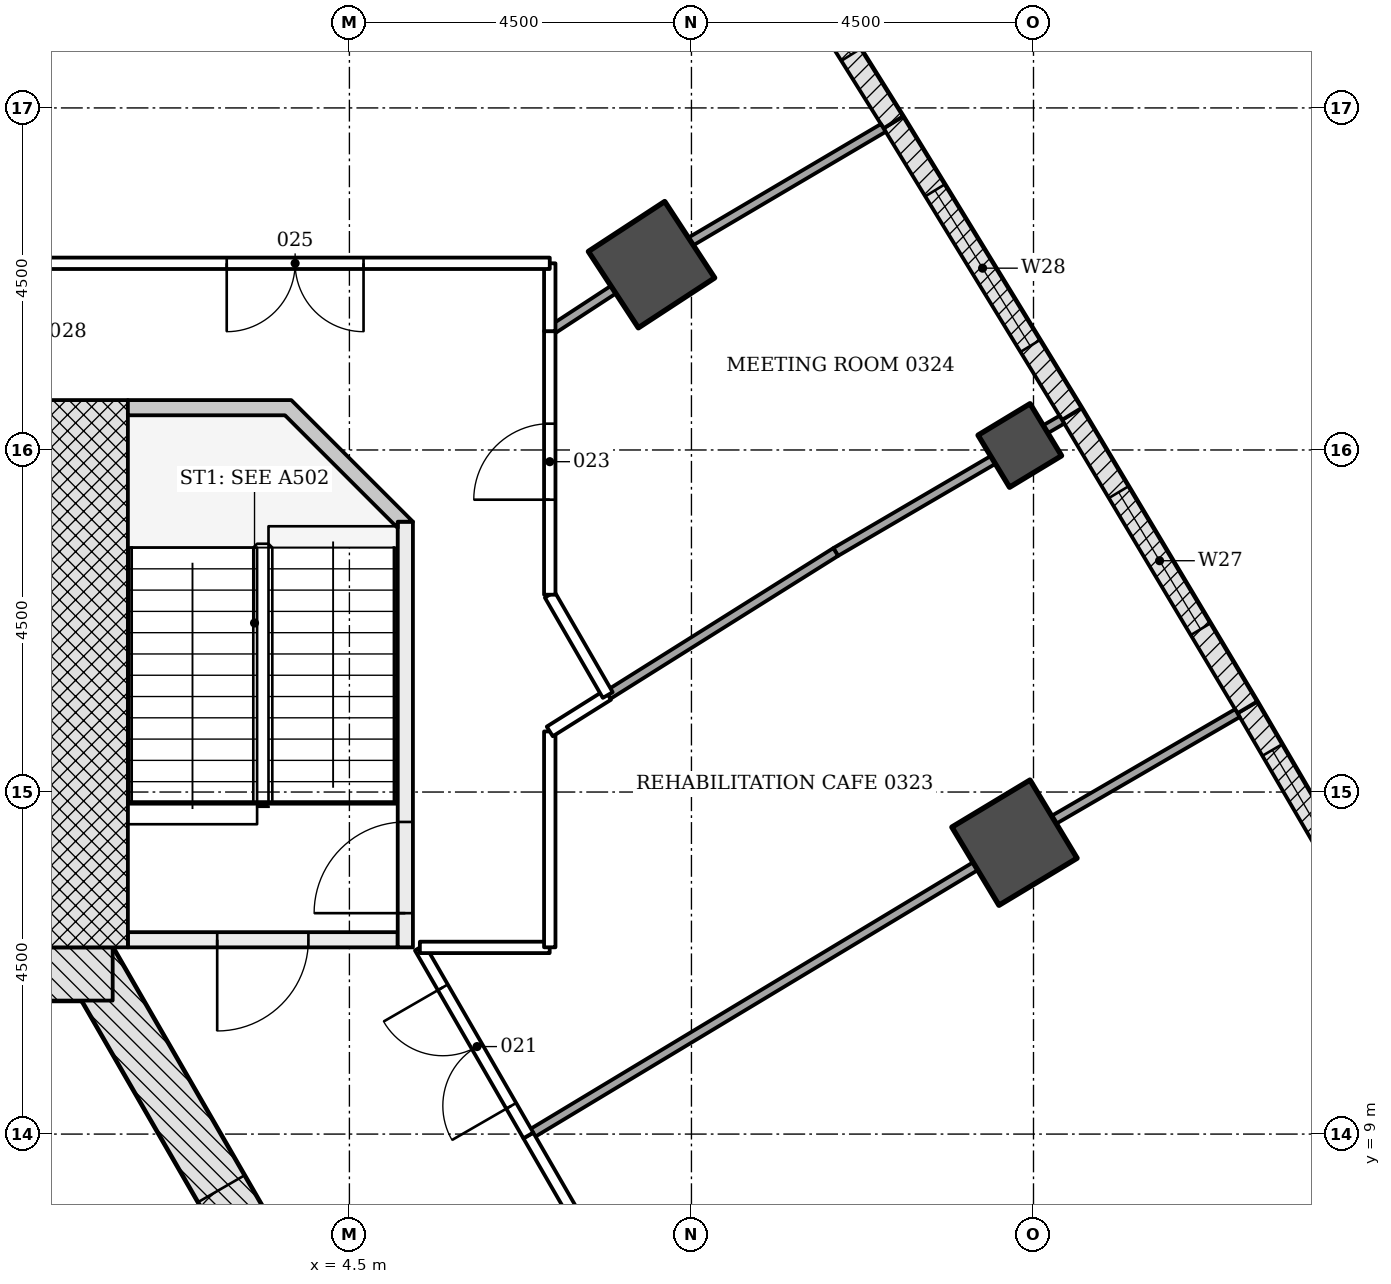
"""IFC4 building model, lengths in metres.
Left out: names, types, materials, properties, quantities, classifications, styles, units other than length and angle.
Written with IfcOpenShell. Run it as: python <this file> out.ifc"""

import sys

from ifc_helpers import new_model, si_unit, direction, frame, frame_2d, origin, origin_2d, place, context, subcontext, project, spatial, polyline, rectangle, outline, extrude, element, fill, save


model = new_model("IFC4")
c1 = context("Model", 3, precision=1e-05, world=origin(), true_north=direction((0.0, 1.0)))
c2 = subcontext(c1, "Body", "Model", "MODEL_VIEW")
j1 = project(units=[si_unit("LENGTHUNIT", "METRE"), si_unit("PLANEANGLEUNIT", "RADIAN")], contexts=[c1])
p1 = place(None, origin())
s1 = spatial("IfcSite", under=j1, at=p1, CompositionType="ELEMENT")
p2 = place(p1, origin())
s2 = spatial("IfcBuilding", under=s1, at=p2, CompositionType="ELEMENT")
p3 = place(p2, frame((0.0, 0.0, 15.0)))
s3 = spatial("IfcBuildingStorey", under=s2, at=p3, CompositionType="ELEMENT", Elevation=15.0)
for number, where, z_axis, x_axis in (
    (1, (13.25, 12.834, -0.25), (0.0, 0.0, 1.0), (0.857, 0.516, 0.0)),
    (2, (8.475, 20.438, -0.25), (0.0, 0.0, 1.0), (0.837, 0.547, 0.0)),
):
    element("IfcColumn", number, at=place(p3, frame(where, z_axis=z_axis, x_axis=x_axis)), inside=s3, PredefinedType="COLUMN", context=c2, shape_type="SweptSolid", body=[
        extrude(rectangle(XDim=1.2, YDim=1.2, at=origin_2d()), origin(), (0.0, 0.0, 1.0), 4.5),
    ])
p4 = place(p3, frame((13.32, 18.059, -0.25), z_axis=(0.0, 0.0, 1.0), x_axis=(0.855574189811, 0.517680215702, 0.0)))
e3 = element("IfcColumn", 3, at=p4, inside=s3, PredefinedType="COLUMN", context=c2, shape_type="SweptSolid", body=[
    extrude(rectangle(XDim=0.8, YDim=0.8, at=origin_2d()), origin(), (0.0, 0.0, 1.0), 4.5),
])
p5 = place(p3, frame((10.311, -4.703, -0.25), z_axis=(0.0, 0.0, 1.0), x_axis=(-0.500001446645, 0.866024568562, 0.0)))
e4 = element("IfcWall", 4, at=p5, inside=s3, PredefinedType="SHEAR", context=c2, shape_type="SweptSolid", body=[
    extrude(rectangle(XDim=18.458, YDim=0.7, at=frame_2d((9.229, 0.0))), origin(), (0.0, 0.0, 1.0), 4.5),
])
p6 = place(p5, frame((8.7, 0.0, 0.25)))
e5 = element("IfcOpeningElement", 5, at=p6, cuts=e4, PredefinedType="OPENING", context=c2, shape_type="SweptSolid", body=[
    extrude(rectangle(XDim=1.0, YDim=2.1, at=frame_2d((0.5, 1.05))), frame((0.0, 0.36, 0.0), z_axis=(0.0, -1.0, 0.0), x_axis=(1.0, 0.0, 0.0)), (0.0, 0.0, 1.0), 0.72),
])
p7 = place(p5, frame((4.002, 0.0, 0.25)))
e6 = element("IfcOpeningElement", 6, at=p7, cuts=e4, PredefinedType="OPENING", context=c2, shape_type="SweptSolid", body=[
    extrude(rectangle(XDim=0.9, YDim=2.1, at=frame_2d((0.45, 1.05))), frame((0.0, 0.36, 0.0), z_axis=(0.0, -1.0, 0.0), x_axis=(1.0, 0.0, 0.0)), (0.0, 0.0, 1.0), 0.72),
])
p8 = place(p5, frame((14.093, 0.0, 0.25)))
e7 = element("IfcOpeningElement", 7, at=p8, cuts=e4, PredefinedType="OPENING", context=c2, shape_type="SweptSolid", body=[
    extrude(rectangle(XDim=0.9, YDim=2.1, at=frame_2d((0.45, 1.05))), frame((0.0, 0.36, 0.0), z_axis=(0.0, -1.0, 0.0), x_axis=(1.0, 0.0, 0.0)), (0.0, 0.0, 1.0), 0.72),
])
p9 = place(p3, frame((1.386, 11.106, -0.25), z_axis=(0.0, 0.0, 1.0), x_axis=(-1.0, 0.0, 0.0)))
e8 = element("IfcWall", 8, at=p9, inside=s3, PredefinedType="SHEAR", context=c2, shape_type="SweptSolid", body=[
    extrude(rectangle(XDim=2.771, YDim=0.7, at=frame_2d((1.386, 0.0))), origin(), (0.0, 0.0, 1.0), 4.5),
])
p10 = place(p3, frame((16.314, 14.612, 0.0), z_axis=(0.0, 0.0, 1.0), x_axis=(0.50445499627, -0.86343798662, 0.0)))
e9 = element("IfcWall", 9, at=p10, inside=s3, PredefinedType="NOTDEFINED", context=c2, shape_type="SweptSolid", body=[
    extrude(rectangle(XDim=4.496, YDim=0.3, at=frame_2d((2.248, 0.0))), origin(), (0.0, 0.0, 1.0), 4.25),
])
p11 = place(p10, frame((0.648, 0.0, 0.8)))
e10 = element("IfcOpeningElement", 10, at=p11, cuts=e9, PredefinedType="OPENING", context=c2, shape_type="SweptSolid", body=[
    extrude(rectangle(XDim=3.2, YDim=2.7, at=frame_2d((1.6, 1.35))), frame((0.0, 0.16, 0.0), z_axis=(0.0, -1.0, 0.0), x_axis=(1.0, 0.0, 0.0)), (0.0, 0.0, 1.0), 0.32),
])
p12 = place(p3, frame((14.005, 18.472, 0.0), z_axis=(0.0, 0.0, 1.0), x_axis=(0.513257465408, -0.858234684805, 0.0)))
e11 = element("IfcWall", 11, at=p12, inside=s3, PredefinedType="NOTDEFINED", context=c2, shape_type="SweptSolid", body=[
    extrude(rectangle(XDim=4.496, YDim=0.3, at=frame_2d((2.248, 0.0))), origin(), (0.0, 0.0, 1.0), 4.25),
])
p13 = place(p12, frame((1.198, 0.0, 0.8)))
e12 = element("IfcOpeningElement", 12, at=p13, cuts=e11, PredefinedType="OPENING", context=c2, shape_type="SweptSolid", body=[
    extrude(rectangle(XDim=2.1, YDim=3.0, at=frame_2d((1.05, 1.5))), frame((0.0, 0.16, 0.0), z_axis=(0.0, -1.0, 0.0), x_axis=(1.0, 0.0, 0.0)), (0.0, 0.0, 1.0), 0.32),
])
p14 = place(p3, frame((11.656, 22.309, 0.0), z_axis=(0.0, 0.0, 1.0), x_axis=(0.522078085402, -0.852897691838, 0.0)))
e13 = element("IfcWall", 13, at=p14, inside=s3, PredefinedType="NOTDEFINED", context=c2, shape_type="SweptSolid", body=[
    extrude(rectangle(XDim=4.496, YDim=0.3, at=frame_2d((2.248, 0.0))), origin(), (0.0, 0.0, 1.0), 4.25),
])
p15 = place(p14, frame((1.048, 0.0, 0.9)))
e14 = element("IfcOpeningElement", 14, at=p15, cuts=e13, PredefinedType="OPENING", context=c2, shape_type="SweptSolid", body=[
    extrude(rectangle(XDim=2.4, YDim=2.4, at=frame_2d((1.2, 1.2))), frame((0.0, 0.16, 0.0), z_axis=(0.0, -1.0, 0.0), x_axis=(1.0, 0.0, 0.0)), (0.0, 0.0, 1.0), 0.32),
])
p16 = place(p3, frame((9.269, 26.122, 0.0), z_axis=(0.0, 0.0, 1.0), x_axis=(0.530804082031, -0.847494558389, 0.0)))
e15 = element("IfcWall", 15, at=p16, inside=s3, PredefinedType="NOTDEFINED", context=c2, shape_type="SweptSolid", body=[
    extrude(rectangle(XDim=4.496, YDim=0.3, at=frame_2d((2.248, 0.0))), origin(), (0.0, 0.0, 1.0), 4.25),
])
p17 = place(p16, frame((1.048, 0.0, 0.9)))
e16 = element("IfcOpeningElement", 16, at=p17, cuts=e15, PredefinedType="OPENING", context=c2, shape_type="SweptSolid", body=[
    extrude(rectangle(XDim=2.4, YDim=2.4, at=frame_2d((1.2, 1.2))), frame((0.0, 0.16, 0.0), z_axis=(0.0, -1.0, 0.0), x_axis=(1.0, 0.0, 0.0)), (0.0, 0.0, 1.0), 0.32),
])
p18 = place(p3, frame((5.135, 11.556, -0.25), z_axis=(0.0, 0.0, 1.0), x_axis=(-1.0, 0.0, 0.0)))
e17 = element("IfcWall", 17, at=p18, inside=s3, PredefinedType="SHEAR", context=c2, shape_type="SweptSolid", body=[
    extrude(rectangle(XDim=3.55, YDim=0.2, at=frame_2d((1.775, 0.0))), origin(), (0.0, 0.0, 1.0), 4.5),
])
p19 = place(p18, frame((1.175, 0.0, 0.25)))
e18 = element("IfcOpeningElement", 18, at=p19, cuts=e17, PredefinedType="OPENING", context=c2, shape_type="SweptSolid", body=[
    extrude(rectangle(XDim=1.2, YDim=2.1, at=frame_2d((0.6, 1.05))), frame((0.0, 0.11, 0.0), z_axis=(0.0, -1.0, 0.0), x_axis=(1.0, 0.0, 0.0)), (0.0, 0.0, 1.0), 0.22),
])
p20 = place(p3, frame((5.236, 11.456, -0.25), z_axis=(0.0, 0.0, 1.0), x_axis=(0.0, 1.0, 0.0)))
e19 = element("IfcWall", 19, at=p20, inside=s3, PredefinedType="SHEAR", context=c2, shape_type="SweptSolid", body=[
    extrude(rectangle(XDim=5.6, YDim=0.2, at=frame_2d((2.8, 0.0))), origin(), (0.0, 0.0, 1.0), 4.5),
])
p21 = place(p20, frame((0.45, 0.0, 0.25)))
e20 = element("IfcOpeningElement", 20, at=p21, cuts=e19, PredefinedType="OPENING", context=c2, shape_type="SweptSolid", body=[
    extrude(rectangle(XDim=1.2, YDim=2.1, at=frame_2d((0.6, 1.05))), frame((0.0, 0.11, 0.0), z_axis=(0.0, -1.0, 0.0), x_axis=(1.0, 0.0, 0.0)), (0.0, 0.0, 1.0), 0.22),
])
p22 = place(p3, frame((1.018, 11.456, -0.25), z_axis=(0.0, 0.0, 1.0), x_axis=(0.0, 1.0, 0.0)))
e21 = element("IfcWall", 21, at=p22, inside=s3, PredefinedType="SHEAR", context=c2, shape_type="SweptSolid", body=[
    extrude(rectangle(XDim=7.2, YDim=1.136, at=frame_2d((3.6, 0.0))), origin(), (0.0, 0.0, 1.0), 4.5),
])
p23 = place(p3, frame((0.0, 0.0, -0.25)))
e22 = element("IfcWall", 22, at=p23, inside=s3, PredefinedType="SHEAR", context=c2, shape_type="SweptSolid", body=[
    extrude(outline(polyline([(5.336, 17.056), (3.736, 18.656), (1.586, 18.656), (1.586, 18.456), (3.653, 18.456), (5.135, 16.974), (5.135, 17.056), (5.135, 17.056), (5.135, 17.056), (5.135, 17.056), (5.135, 17.056), (5.135, 17.056), (5.135, 17.056), (5.135, 17.056), (5.135, 17.056), (5.135, 17.056), (5.135, 17.056), (5.135, 17.056), (5.135, 17.056), (5.135, 17.056), (5.135, 17.056), (5.135, 17.056), (5.135, 17.056), (5.336, 17.056)])), origin(), (0.0, 0.0, 1.0), 4.5),
])
p24 = place(p3, frame((11.206, 1.446, 0.0), z_axis=(0.0, 0.0, 1.0), x_axis=(-0.500116761363, 0.865957981085, 0.0)))
e23 = element("IfcWall", 23, at=p24, inside=s3, PredefinedType="PARTITIONING", context=c2, shape_type="SweptSolid", body=[
    extrude(rectangle(XDim=8.7, YDim=0.15, at=frame_2d((4.35, 0.0))), origin(), (0.0, 0.0, 1.0), 3.638),
])
p25 = place(p24, frame((3.45, 0.0, 0.0)))
e24 = element("IfcOpeningElement", 24, at=p25, cuts=e23, PredefinedType="OPENING", context=c2, shape_type="SweptSolid", body=[
    extrude(rectangle(XDim=1.8, YDim=2.1, at=frame_2d((0.9, 1.05))), frame((0.0, 0.085, 0.0), z_axis=(0.0, -1.0, 0.0), x_axis=(1.0, 0.0, 0.0)), (0.0, 0.0, 1.0), 0.17),
])
p26 = place(p3, frame((6.854, 8.982, 0.0), z_axis=(0.0, 0.0, 1.0), x_axis=(-0.499919889281, 0.866071650789, 0.0)))
e25 = element("IfcWall", 25, at=p26, inside=s3, PredefinedType="PARTITIONING", context=c2, shape_type="SweptSolid", body=[
    extrude(rectangle(XDim=2.854, YDim=0.15, at=frame_2d((1.427, 0.0))), origin(), (0.0, 0.0, 1.0), 3.638),
])
p27 = place(p26, frame((0.45, 0.0, 0.0)))
e26 = element("IfcOpeningElement", 26, at=p27, cuts=e25, PredefinedType="OPENING", context=c2, shape_type="SweptSolid", body=[
    extrude(rectangle(XDim=1.8, YDim=2.1, at=frame_2d((0.9, 1.05))), frame((0.0, 0.085, 0.0), z_axis=(0.0, -1.0, 0.0), x_axis=(1.0, 0.0, 0.0)), (0.0, 0.0, 1.0), 0.17),
])
p28 = place(p3, frame((5.427, 11.456, 0.0), z_axis=(0.0, 0.0, 1.0), x_axis=(1.0, 0.0, 0.0)))
e27 = element("IfcWall", 27, at=p28, inside=s3, PredefinedType="PARTITIONING", context=c2, shape_type="SweptSolid", body=[
    extrude(rectangle(XDim=1.708, YDim=0.15, at=frame_2d((0.854, 0.0))), origin(), (0.0, 0.0, 1.0), 4.25),
])
p29 = place(p3, frame((7.136, 11.457, 0.0), z_axis=(0.0, 0.0, 1.0), x_axis=(0.0, 1.0, 0.0)))
e28 = element("IfcWall", 28, at=p29, inside=s3, PredefinedType="PARTITIONING", context=c2, shape_type="SweptSolid", body=[
    extrude(rectangle(XDim=2.84, YDim=0.15, at=frame_2d((1.42, 0.0))), origin(), (0.0, 0.0, 1.0), 3.638),
])
p30 = place(p3, frame((7.136, 14.297, 0.0), z_axis=(0.0, 0.0, 1.0), x_axis=(0.846935212822, 0.531696102377, 0.0)))
e29 = element("IfcWall", 29, at=p30, inside=s3, PredefinedType="PARTITIONING", context=c2, shape_type="SweptSolid", body=[
    extrude(rectangle(XDim=0.905, YDim=0.15, at=frame_2d((0.452, 0.0))), origin(), (0.0, 0.0, 1.0), 3.638),
])
p31 = place(p3, frame((7.899, 14.776, 0.0), z_axis=(0.0, 0.0, 1.0), x_axis=(-0.500392307633, 0.865798786359, 0.0)))
e30 = element("IfcWall", 30, at=p31, inside=s3, PredefinedType="PARTITIONING", context=c2, shape_type="SweptSolid", body=[
    extrude(rectangle(XDim=1.525, YDim=0.15, at=frame_2d((0.762, 0.0))), origin(), (0.0, 0.0, 1.0), 3.638),
])
p32 = place(p3, frame((7.136, 16.096, 0.0), z_axis=(0.0, 0.0, 1.0), x_axis=(0.0, 1.0, 0.0)))
e31 = element("IfcWall", 31, at=p32, inside=s3, PredefinedType="PARTITIONING", context=c2, shape_type="SweptSolid", body=[
    extrude(rectangle(XDim=3.467, YDim=0.15, at=frame_2d((1.733, 0.0))), origin(), (0.0, 0.0, 1.0), 3.638),
])
p33 = place(p32, frame((1.25, 0.0, 0.0)))
e32 = element("IfcOpeningElement", 32, at=p33, cuts=e31, PredefinedType="OPENING", context=c2, shape_type="SweptSolid", body=[
    extrude(rectangle(XDim=1.0, YDim=2.1, at=frame_2d((0.5, 1.05))), frame((0.0, 0.085, 0.0), z_axis=(0.0, -1.0, 0.0), x_axis=(1.0, 0.0, 0.0)), (0.0, 0.0, 1.0), 0.17),
])
p34 = place(p3, frame((7.136, 19.563, 0.0), z_axis=(0.0, 0.0, 1.0), x_axis=(0.0, 1.0, 0.0)))
e33 = element("IfcWall", 33, at=p34, inside=s3, PredefinedType="PARTITIONING", context=c2, shape_type="SweptSolid", body=[
    extrude(rectangle(XDim=0.893, YDim=0.15, at=frame_2d((0.447, 0.0))), origin(), (0.0, 0.0, 1.0), 3.638),
])
p35 = place(p3, frame((7.136, 20.456, 0.0), z_axis=(0.0, 0.0, 1.0), x_axis=(-1.0, 0.0, 0.0)))
e34 = element("IfcWall", 34, at=p35, inside=s3, PredefinedType="PARTITIONING", context=c2, shape_type="SweptSolid", body=[
    extrude(rectangle(XDim=6.686, YDim=0.15, at=frame_2d((3.343, 0.0))), origin(), (0.0, 0.0, 1.0), 3.638),
])
p36 = place(p35, frame((2.45, 0.0, 0.0)))
e35 = element("IfcOpeningElement", 35, at=p36, cuts=e34, PredefinedType="OPENING", context=c2, shape_type="SweptSolid", body=[
    extrude(rectangle(XDim=1.8, YDim=2.1, at=frame_2d((0.9, 1.05))), frame((0.0, 0.085, 0.0), z_axis=(0.0, -1.0, 0.0), x_axis=(1.0, 0.0, 0.0)), (0.0, 0.0, 1.0), 0.17),
])
p37 = place(p3, frame((12.736, 12.524, 0.0), z_axis=(0.0, 0.0, 1.0), x_axis=(-0.8565972601, -0.515985594749, 0.0)))
e36 = element("IfcWall", 36, at=p37, inside=s3, PredefinedType="PARTITIONING", context=c2, shape_type="SweptSolid", body=[
    extrude(rectangle(XDim=6.865, YDim=0.12, at=frame_2d((3.432, 0.0))), origin(), (0.0, 0.0, 1.0), 3.638),
])
p38 = place(p3, frame((16.183, 14.538, 0.0), z_axis=(0.0, 0.0, 1.0), x_axis=(-0.864576979504, -0.50250039454, 0.0)))
e37 = element("IfcWall", 37, at=p38, inside=s3, PredefinedType="PARTITIONING", context=c2, shape_type="SweptSolid", body=[
    extrude(rectangle(XDim=2.792, YDim=0.12, at=frame_2d((1.396, 0.0))), origin(), (0.0, 0.0, 1.0), 3.633),
])
p39 = place(p3, frame((12.968, 17.869, 0.0), z_axis=(0.0, 0.0, 1.0), x_axis=(-0.863161652457, -0.504927679701, 0.0)))
e38 = element("IfcWall", 38, at=p39, inside=s3, PredefinedType="PARTITIONING", context=c2, shape_type="SweptSolid", body=[
    extrude(rectangle(XDim=2.398, YDim=0.12, at=frame_2d((1.199, 0.0))), origin(), (0.0, 0.0, 1.0), 3.638),
])
p40 = place(p3, frame((10.898, 16.658, 0.0), z_axis=(0.0, 0.0, 1.0), x_axis=(-0.846864700387, -0.531808404634, 0.0)))
e39 = element("IfcWall", 39, at=p40, inside=s3, PredefinedType="PARTITIONING", context=c2, shape_type="SweptSolid", body=[
    extrude(rectangle(XDim=3.539, YDim=0.12, at=frame_2d((1.77, 0.0))), origin(), (0.0, 0.0, 1.0), 3.638),
])
p41 = place(p3, frame((13.874, 18.399, 0.0), z_axis=(0.0, 0.0, 1.0), x_axis=(-0.863885093979, -0.503688936151, 0.0)))
e40 = element("IfcWall", 40, at=p41, inside=s3, PredefinedType="PARTITIONING", context=c2, shape_type="SweptSolid", body=[
    extrude(rectangle(XDim=0.25, YDim=0.12, at=frame_2d((0.125, 0.0))), origin(), (0.0, 0.0, 1.0), 4.25),
])
p42 = place(p3, frame((7.973, 20.109, 0.0), z_axis=(0.0, 0.0, 1.0), x_axis=(-0.836986858992, -0.547222987341, 0.0)))
e41 = element("IfcWall", 41, at=p42, inside=s3, PredefinedType="PARTITIONING", context=c2, shape_type="SweptSolid", body=[
    extrude(rectangle(XDim=0.998, YDim=0.12, at=frame_2d((0.499, 0.0))), origin(), (0.0, 0.0, 1.0), 3.638),
])
p43 = place(p3, frame((11.524, 22.237, 0.0), z_axis=(0.0, 0.0, 1.0), x_axis=(-0.861228913487, -0.508217235613, 0.0)))
e42 = element("IfcWall", 42, at=p43, inside=s3, PredefinedType="PARTITIONING", context=c2, shape_type="SweptSolid", body=[
    extrude(rectangle(XDim=2.94, YDim=0.12, at=frame_2d((1.47, 0.0))), origin(), (0.0, 0.0, 1.0), 3.633),
])
p44 = place(p11, origin())
e43 = element("IfcWindow", 43, at=p44, inside=s3, PartitioningType="TRIPLE_PANEL_VERTICAL", PredefinedType="WINDOW", context=c2, shape_type="SweptSolid", body=[
    extrude(rectangle(XDim=3.2, YDim=2.7, at=frame_2d((1.6, 1.35))), frame((0.0, 0.03, 0.0), z_axis=(0.0, -1.0, 0.0), x_axis=(1.0, 0.0, 0.0)), (0.0, 0.0, 1.0), 0.06),
])
fill(e10, e43)
p45 = place(p13, origin())
e44 = element("IfcWindow", 44, at=p45, inside=s3, PartitioningType="DOUBLE_PANEL_HORIZONTAL", PredefinedType="WINDOW", context=c2, shape_type="SweptSolid", body=[
    extrude(rectangle(XDim=2.1, YDim=3.0, at=frame_2d((1.05, 1.5))), frame((0.0, 0.03, 0.0), z_axis=(0.0, -1.0, 0.0), x_axis=(1.0, 0.0, 0.0)), (0.0, 0.0, 1.0), 0.06),
])
fill(e12, e44)
p46 = place(p15, origin())
e45 = element("IfcWindow", 45, at=p46, inside=s3, PartitioningType="DOUBLE_PANEL_VERTICAL", PredefinedType="WINDOW", context=c2, shape_type="SweptSolid", body=[
    extrude(rectangle(XDim=2.4, YDim=2.4, at=frame_2d((1.2, 1.2))), frame((0.0, 0.03, 0.0), z_axis=(0.0, -1.0, 0.0), x_axis=(1.0, 0.0, 0.0)), (0.0, 0.0, 1.0), 0.06),
])
fill(e14, e45)
p47 = place(p17, origin())
e46 = element("IfcWindow", 46, at=p47, inside=s3, PartitioningType="DOUBLE_PANEL_VERTICAL", PredefinedType="WINDOW", context=c2, shape_type="SweptSolid", body=[
    extrude(rectangle(XDim=2.4, YDim=2.4, at=frame_2d((1.2, 1.2))), frame((0.0, 0.03, 0.0), z_axis=(0.0, -1.0, 0.0), x_axis=(1.0, 0.0, 0.0)), (0.0, 0.0, 1.0), 0.06),
])
fill(e16, e46)
p48 = place(p8, origin())
e47 = element("IfcDoor", 47, at=p48, inside=s3, OperationType="SINGLE_SWING_LEFT", PredefinedType="DOOR", context=c2, shape_type="SweptSolid", body=[
    extrude(rectangle(XDim=0.9, YDim=2.1, at=frame_2d((0.45, 1.05))), frame((0.0, 0.075, 0.0), z_axis=(0.0, -1.0, 0.0), x_axis=(1.0, 0.0, 0.0)), (0.0, 0.0, 1.0), 0.15),
])
fill(e7, e47)
p49 = place(p19, origin())
e48 = element("IfcDoor", 48, at=p49, inside=s3, OperationType="SINGLE_SWING_RIGHT", PredefinedType="DOOR", context=c2, shape_type="SweptSolid", body=[
    extrude(rectangle(XDim=1.2, YDim=2.1, at=frame_2d((0.6, 1.05))), frame((0.0, 0.025, 0.0), z_axis=(0.0, -1.0, 0.0), x_axis=(1.0, 0.0, 0.0)), (0.0, 0.0, 1.0), 0.05),
])
fill(e18, e48)
p50 = place(p21, origin())
e49 = element("IfcDoor", 49, at=p50, inside=s3, OperationType="SINGLE_SWING_LEFT", PredefinedType="DOOR", context=c2, shape_type="SweptSolid", body=[
    extrude(rectangle(XDim=1.2, YDim=2.1, at=frame_2d((0.6, 1.05))), frame((0.0, 0.025, 0.0), z_axis=(0.0, -1.0, 0.0), x_axis=(1.0, 0.0, 0.0)), (0.0, 0.0, 1.0), 0.05),
])
fill(e20, e49)
p51 = place(p27, origin())
e50 = element("IfcDoor", 50, at=p51, inside=s3, OperationType="DOUBLE_DOOR_SINGLE_SWING", PredefinedType="DOOR", context=c2, shape_type="SweptSolid", body=[
    extrude(rectangle(XDim=1.8, YDim=2.1, at=frame_2d((0.9, 1.05))), frame((0.0, 0.025, 0.0), z_axis=(0.0, -1.0, 0.0), x_axis=(1.0, 0.0, 0.0)), (0.0, 0.0, 1.0), 0.05),
])
fill(e26, e50)
p52 = place(p33, origin())
e51 = element("IfcDoor", 51, at=p52, inside=s3, OperationType="SINGLE_SWING_LEFT", PredefinedType="DOOR", context=c2, shape_type="SweptSolid", body=[
    extrude(rectangle(XDim=1.0, YDim=2.1, at=frame_2d((0.5, 1.05))), frame((0.0, 0.025, 0.0), z_axis=(0.0, -1.0, 0.0), x_axis=(1.0, 0.0, 0.0)), (0.0, 0.0, 1.0), 0.05),
])
fill(e32, e51)
p53 = place(p36, origin())
e52 = element("IfcDoor", 52, at=p53, inside=s3, OperationType="DOUBLE_DOOR_SINGLE_SWING", PredefinedType="DOOR", context=c2, shape_type="SweptSolid", body=[
    extrude(rectangle(XDim=1.8, YDim=2.1, at=frame_2d((0.9, 1.05))), frame((0.0, 0.025, 0.0), z_axis=(0.0, -1.0, 0.0), x_axis=(1.0, 0.0, 0.0)), (0.0, 0.0, 1.0), 0.05),
])
fill(e35, e52)
save(model, sys.argv[1])
